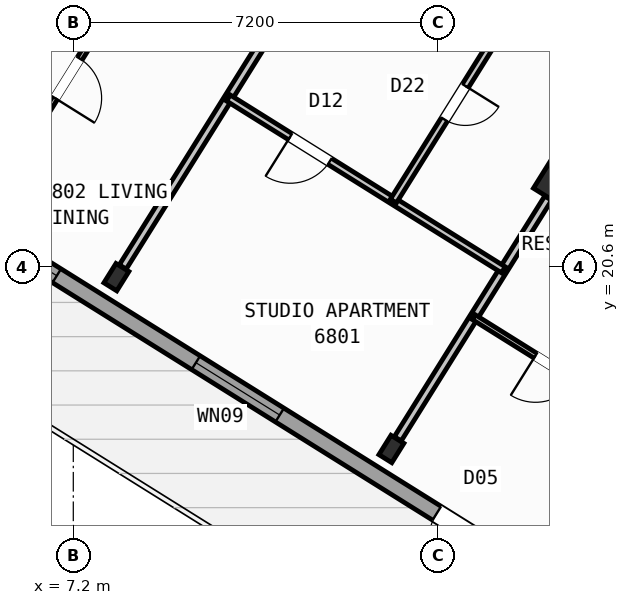
"""IFC4 building model, lengths in metres.
Left out: names, types, materials, properties, quantities, classifications, styles, units other than length and angle.
Written with IfcOpenShell. Run it as: python <this file> out.ifc"""

import sys

from ifc_helpers import new_model, si_unit, direction, frame, frame_2d, origin, origin_2d, place, context, subcontext, project, spatial, rectangle, hollow_rectangle, i_section, extrude, source, transform, mapped, element, fill, save


model = new_model("IFC4")
c1 = context("Model", 3, precision=1e-05, world=origin(), true_north=direction((0.0, 1.0)))
c2 = subcontext(c1, "Body", "Model", "MODEL_VIEW")
j1 = project(units=[si_unit("LENGTHUNIT", "METRE"), si_unit("PLANEANGLEUNIT", "RADIAN")], contexts=[c1])
p1 = place(None, origin())
s1 = spatial("IfcSite", under=j1, at=p1, CompositionType="ELEMENT")
p2 = place(p1, origin())
s2 = spatial("IfcBuilding", under=s1, at=p2, CompositionType="ELEMENT")
p3 = place(p2, frame((0.0, 0.0, 270.0)))
s3 = spatial("IfcBuildingStorey", under=s2, at=p3, CompositionType="ELEMENT", Elevation=270.0)
m1 = source(origin(), c2, "Body", "SweptSolid", [
    extrude(hollow_rectangle(XDim=0.7, YDim=0.7, WallThickness=0.028, at=origin_2d()), origin(), (0.0, 0.0, 1.0), 3.6),
])
p4 = place(p3, frame((16.764, 22.261, 0.0), z_axis=(0.0, 0.0, 1.0), x_axis=(-0.848048096156, 0.529919264233, 0.0)))
e1 = element("IfcColumn", 1, at=p4, inside=s3, PredefinedType="COLUMN", context=c2, shape_type="MappedRepresentation", body=[
    mapped(m1, transform((0.0, 0.0, 0.0), scale=1.0)),
])
m2 = source(origin(), c2, "Body", "SweptSolid", [
    extrude(i_section(OverallWidth=0.3, OverallDepth=0.45, WebThickness=0.014, FlangeThickness=0.026, at=origin_2d()), origin(), (0.0, 0.0, 1.0), 3.6),
])
for number, where, z_axis, x_axis in (
    (2, (13.478, 17.003, 0.0), (0.0, 0.0, 1.0), (-0.848, 0.53, 0.0)),
    (3, (8.051, 20.395, 0.0), (0.0, 0.0, 1.0), (-0.848, 0.53, 0.0)),
):
    element("IfcColumn", number, at=place(p3, frame(where, z_axis=z_axis, x_axis=x_axis)), inside=s3, PredefinedType="COLUMN", context=c2, shape_type="MappedRepresentation", body=[
        mapped(m2, transform((0.0, 0.0, 0.0), scale=1.0)),
    ])
p5 = place(p3, frame((29.268, 6.429, 0.0), z_axis=(0.0, 0.0, 1.0), x_axis=(-0.848049971435, 0.529916263149, 0.0)))
e4 = element("IfcWall", 4, at=p5, inside=s3, PredefinedType="STANDARD", context=c2, shape_type="SweptSolid", body=[
    extrude(rectangle(XDim=31.588, YDim=0.32, at=frame_2d((15.794, 0.0))), origin(), (0.0, 0.0, 1.0), 3.35),
])
p6 = place(p5, frame((16.362, 0.0, 0.0)))
e5 = element("IfcOpeningElement", 5, at=p6, cuts=e4, PredefinedType="OPENING", context=c2, shape_type="SweptSolid", body=[
    extrude(rectangle(XDim=1.2, YDim=2.15, at=frame_2d((0.6, 1.075))), frame((0.0, 0.17, 0.0), z_axis=(0.0, -1.0, 0.0), x_axis=(1.0, 0.0, 0.0)), (0.0, 0.0, 1.0), 0.34),
])
p7 = place(p5, frame((3.859, 0.0, 0.9)))
e6 = element("IfcOpeningElement", 6, at=p7, cuts=e4, PredefinedType="OPENING", context=c2, shape_type="SweptSolid", body=[
    extrude(rectangle(XDim=1.65, YDim=1.45, at=frame_2d((0.825, 0.725))), frame((0.0, 0.17, 0.0), z_axis=(0.0, -1.0, 0.0), x_axis=(1.0, 0.0, 0.0)), (0.0, 0.0, 1.0), 0.34),
])
p8 = place(p5, frame((10.519, 0.0, 0.9)))
e7 = element("IfcOpeningElement", 7, at=p8, cuts=e4, PredefinedType="OPENING", context=c2, shape_type="SweptSolid", body=[
    extrude(rectangle(XDim=1.65, YDim=1.45, at=frame_2d((0.825, 0.725))), frame((0.0, 0.17, 0.0), z_axis=(0.0, -1.0, 0.0), x_axis=(1.0, 0.0, 0.0)), (0.0, 0.0, 1.0), 0.34),
])
p9 = place(p5, frame((21.219, 0.0, 0.95)))
e8 = element("IfcOpeningElement", 8, at=p9, cuts=e4, PredefinedType="OPENING", context=c2, shape_type="SweptSolid", body=[
    extrude(rectangle(XDim=1.95, YDim=1.35, at=frame_2d((0.975, 0.675))), frame((0.0, 0.17, 0.0), z_axis=(0.0, -1.0, 0.0), x_axis=(1.0, 0.0, 0.0)), (0.0, 0.0, 1.0), 0.34),
])
p10 = place(p5, frame((26.406, 0.0, 1.0)))
e9 = element("IfcOpeningElement", 9, at=p10, cuts=e4, PredefinedType="OPENING", context=c2, shape_type="SweptSolid", body=[
    extrude(rectangle(XDim=0.9, YDim=1.25, at=frame_2d((0.45, 0.625))), frame((0.0, 0.17, 0.0), z_axis=(0.0, -1.0, 0.0), x_axis=(1.0, 0.0, 0.0)), (0.0, 0.0, 1.0), 0.34),
])
p11 = place(p5, frame((29.143, 0.0, 0.9)))
e10 = element("IfcOpeningElement", 10, at=p11, cuts=e4, PredefinedType="OPENING", context=c2, shape_type="SweptSolid", body=[
    extrude(rectangle(XDim=1.65, YDim=1.45, at=frame_2d((0.825, 0.725))), frame((0.0, 0.17, 0.0), z_axis=(0.0, -1.0, 0.0), x_axis=(1.0, 0.0, 0.0)), (0.0, 0.0, 1.0), 0.34),
])
p12 = place(p3, frame((2.415, 23.452, 0.0), z_axis=(0.0, 0.0, 1.0), x_axis=(0.52991049553, 0.848053575387, 0.0)))
e11 = element("IfcWall", 11, at=p12, inside=s3, PredefinedType="STANDARD", context=c2, shape_type="SweptSolid", body=[
    extrude(rectangle(XDim=21.587, YDim=0.32, at=frame_2d((10.794, 0.0))), origin(), (0.0, 0.0, 1.0), 2.875),
])
p13 = place(p12, frame((2.606, 0.0, 0.9)))
e12 = element("IfcOpeningElement", 12, at=p13, cuts=e11, PredefinedType="OPENING", context=c2, shape_type="SweptSolid", body=[
    extrude(rectangle(XDim=1.65, YDim=1.45, at=frame_2d((0.825, 0.725))), frame((0.0, 0.17, 0.0), z_axis=(0.0, -1.0, 0.0), x_axis=(1.0, 0.0, 0.0)), (0.0, 0.0, 1.0), 0.34),
])
p14 = place(p12, frame((7.504, 0.0, 1.0)))
e13 = element("IfcOpeningElement", 13, at=p14, cuts=e11, PredefinedType="OPENING", context=c2, shape_type="SweptSolid", body=[
    extrude(rectangle(XDim=0.9, YDim=1.25, at=frame_2d((0.45, 0.625))), frame((0.0, 0.17, 0.0), z_axis=(0.0, -1.0, 0.0), x_axis=(1.0, 0.0, 0.0)), (0.0, 0.0, 1.0), 0.34),
])
p15 = place(p12, frame((12.084, 0.0, 1.0)))
e14 = element("IfcOpeningElement", 14, at=p15, cuts=e11, PredefinedType="OPENING", context=c2, shape_type="SweptSolid", body=[
    extrude(rectangle(XDim=0.9, YDim=1.25, at=frame_2d((0.45, 0.625))), frame((0.0, 0.17, 0.0), z_axis=(0.0, -1.0, 0.0), x_axis=(1.0, 0.0, 0.0)), (0.0, 0.0, 1.0), 0.34),
])
p16 = place(p12, frame((15.619, 0.0, 1.0)))
e15 = element("IfcOpeningElement", 15, at=p16, cuts=e11, PredefinedType="OPENING", context=c2, shape_type="SweptSolid", body=[
    extrude(rectangle(XDim=0.9, YDim=1.25, at=frame_2d((0.45, 0.625))), frame((0.0, 0.17, 0.0), z_axis=(0.0, -1.0, 0.0), x_axis=(1.0, 0.0, 0.0)), (0.0, 0.0, 1.0), 0.34),
])
p17 = place(p12, frame((18.569, 0.0, 1.0)))
e16 = element("IfcOpeningElement", 16, at=p17, cuts=e11, PredefinedType="OPENING", context=c2, shape_type="SweptSolid", body=[
    extrude(rectangle(XDim=0.9, YDim=1.25, at=frame_2d((0.45, 0.625))), frame((0.0, 0.17, 0.0), z_axis=(0.0, -1.0, 0.0), x_axis=(1.0, 0.0, 0.0)), (0.0, 0.0, 1.0), 0.34),
])
p18 = place(p3, frame((21.329, 22.416, 0.0), z_axis=(0.0, 0.0, 1.0), x_axis=(-0.529920220799, -0.848047498427, 0.0)))
e17 = element("IfcWall", 17, at=p18, inside=s3, PredefinedType="PARTITIONING", context=c2, shape_type="SweptSolid", body=[
    extrude(rectangle(XDim=9.2, YDim=0.16, at=frame_2d((4.6, 0.0))), origin(), (0.0, 0.0, 1.0), 3.34),
])
p19 = place(p3, frame((22.495, 24.281, 0.0), z_axis=(0.0, 0.0, 1.0), x_axis=(-0.848052408131, 0.529912363569, 0.0)))
e18 = element("IfcWall", 18, at=p19, inside=s3, PredefinedType="PARTITIONING", context=c2, shape_type="SweptSolid", body=[
    extrude(rectangle(XDim=16.73, YDim=0.16, at=frame_2d((8.365, 0.0))), origin(), (0.0, 0.0, 1.0), 3.34),
])
p20 = place(p19, frame((2.22, 0.0, 0.0)))
e19 = element("IfcOpeningElement", 19, at=p20, cuts=e18, PredefinedType="OPENING", context=c2, shape_type="SweptSolid", body=[
    extrude(rectangle(XDim=0.86, YDim=2.05, at=frame_2d((0.43, 1.025))), frame((0.0, 0.09, 0.0), z_axis=(0.0, -1.0, 0.0), x_axis=(1.0, 0.0, 0.0)), (0.0, 0.0, 1.0), 0.18),
])
p21 = place(p19, frame((6.49, 0.0, 0.0)))
e20 = element("IfcOpeningElement", 20, at=p21, cuts=e18, PredefinedType="OPENING", context=c2, shape_type="SweptSolid", body=[
    extrude(rectangle(XDim=1.0, YDim=2.1, at=frame_2d((0.5, 1.05))), frame((0.0, 0.09, 0.0), z_axis=(0.0, -1.0, 0.0), x_axis=(1.0, 0.0, 0.0)), (0.0, 0.0, 1.0), 0.18),
])
p22 = place(p19, frame((14.76, 0.0, 0.0)))
e21 = element("IfcOpeningElement", 21, at=p22, cuts=e18, PredefinedType="OPENING", context=c2, shape_type="SweptSolid", body=[
    extrude(rectangle(XDim=1.0, YDim=2.1, at=frame_2d((0.5, 1.05))), frame((0.0, 0.09, 0.0), z_axis=(0.0, -1.0, 0.0), x_axis=(1.0, 0.0, 0.0)), (0.0, 0.0, 1.0), 0.18),
])
p23 = place(p3, frame((21.329, 22.416, 0.0), z_axis=(0.0, 0.0, 1.0), x_axis=(-0.848052408131, 0.529912363569, 0.0)))
e22 = element("IfcWall", 22, at=p23, inside=s3, PredefinedType="PARTITIONING", context=c2, shape_type="SweptSolid", body=[
    extrude(rectangle(XDim=16.73, YDim=0.16, at=frame_2d((8.365, 0.0))), origin(), (0.0, 0.0, 1.0), 3.34),
])
p24 = place(p23, frame((1.395, 0.0, 0.0)))
e23 = element("IfcOpeningElement", 23, at=p24, cuts=e22, PredefinedType="OPENING", context=c2, shape_type="SweptSolid", body=[
    extrude(rectangle(XDim=1.0, YDim=2.1, at=frame_2d((0.5, 1.05))), frame((0.0, 0.09, 0.0), z_axis=(0.0, -1.0, 0.0), x_axis=(1.0, 0.0, 0.0)), (0.0, 0.0, 1.0), 0.18),
])
p25 = place(p23, frame((7.82, 0.0, 0.0)))
e24 = element("IfcOpeningElement", 24, at=p25, cuts=e22, PredefinedType="OPENING", context=c2, shape_type="SweptSolid", body=[
    extrude(rectangle(XDim=1.0, YDim=2.1, at=frame_2d((0.5, 1.05))), frame((0.0, 0.09, 0.0), z_axis=(0.0, -1.0, 0.0), x_axis=(1.0, 0.0, 0.0)), (0.0, 0.0, 1.0), 0.18),
])
p26 = place(p23, frame((11.14, 0.0, 0.0)))
e25 = element("IfcOpeningElement", 25, at=p26, cuts=e22, PredefinedType="OPENING", context=c2, shape_type="SweptSolid", body=[
    extrude(rectangle(XDim=1.0, YDim=2.1, at=frame_2d((0.5, 1.05))), frame((0.0, 0.09, 0.0), z_axis=(0.0, -1.0, 0.0), x_axis=(1.0, 0.0, 0.0)), (0.0, 0.0, 1.0), 0.18),
])
p27 = place(p3, frame((16.572, 21.954, 0.0), z_axis=(0.0, 0.0, 1.0), x_axis=(-0.529904903214, -0.848057069748, 0.0)))
e26 = element("IfcWall", 26, at=p27, inside=s3, PredefinedType="PARTITIONING", context=c2, shape_type="SweptSolid", body=[
    extrude(rectangle(XDim=5.601, YDim=0.16, at=frame_2d((2.801, 0.0))), origin(), (0.0, 0.0, 1.0), 2.875),
])
p28 = place(p3, frame((18.318, 17.597, 0.0), z_axis=(0.0, 0.0, 1.0), x_axis=(-0.848059820872, 0.529900500304, 0.0)))
e27 = element("IfcWall", 27, at=p28, inside=s3, PredefinedType="PARTITIONING", context=c2, shape_type="SweptSolid", body=[
    extrude(rectangle(XDim=3.79, YDim=0.11, at=frame_2d((1.895, 0.0))), origin(), (0.0, 0.0, 1.0), 3.34),
])
p29 = place(p28, frame((1.435, 0.0, 0.0)))
e28 = element("IfcOpeningElement", 28, at=p29, cuts=e27, PredefinedType="OPENING", context=c2, shape_type="SweptSolid", body=[
    extrude(rectangle(XDim=0.92, YDim=2.08, at=frame_2d((0.46, 1.04))), frame((0.0, 0.065, 0.0), z_axis=(0.0, -1.0, 0.0), x_axis=(1.0, 0.0, 0.0)), (0.0, 0.0, 1.0), 0.13),
])
p30 = place(p3, frame((11.144, 25.346, 0.0), z_axis=(0.0, 0.0, 1.0), x_axis=(-0.529904903214, -0.848057069748, 0.0)))
e29 = element("IfcWall", 29, at=p30, inside=s3, PredefinedType="PARTITIONING", context=c2, shape_type="SweptSolid", body=[
    extrude(rectangle(XDim=5.601, YDim=0.16, at=frame_2d((2.801, 0.0))), origin(), (0.0, 0.0, 1.0), 2.875),
])
p31 = place(p3, frame((15.688, 20.54, 0.0), z_axis=(0.0, 0.0, 1.0), x_axis=(-0.848049732085, 0.529916646191, 0.0)))
e30 = element("IfcWall", 30, at=p31, inside=s3, PredefinedType="PLUMBINGWALL", context=c2, shape_type="SweptSolid", body=[
    extrude(rectangle(XDim=6.4, YDim=0.14, at=frame_2d((3.2, 0.0))), origin(), (0.0, 0.0, 1.0), 3.34),
])
p32 = place(p31, frame((4.04, 0.0, 0.0)))
e31 = element("IfcOpeningElement", 31, at=p32, cuts=e30, PredefinedType="OPENING", context=c2, shape_type="SweptSolid", body=[
    extrude(rectangle(XDim=0.92, YDim=2.08, at=frame_2d((0.46, 1.04))), frame((0.0, 0.08, 0.0), z_axis=(0.0, -1.0, 0.0), x_axis=(1.0, 0.0, 0.0)), (0.0, 0.0, 1.0), 0.16),
])
p33 = place(p3, frame((15.944, 25.781, 0.0), z_axis=(0.0, 0.0, 1.0), x_axis=(-0.529917480809, -0.848049210561, 0.0)))
e32 = element("IfcWall", 32, at=p33, inside=s3, PredefinedType="PLUMBINGWALL", context=c2, shape_type="SweptSolid", body=[
    extrude(rectangle(XDim=4.58, YDim=0.14, at=frame_2d((2.29, 0.0))), origin(), (0.0, 0.0, 1.0), 3.34),
])
p34 = place(p33, frame((1.9, 0.0, 0.0)))
e33 = element("IfcOpeningElement", 33, at=p34, cuts=e32, PredefinedType="OPENING", context=c2, shape_type="SweptSolid", body=[
    extrude(rectangle(XDim=0.78, YDim=2.05, at=frame_2d((0.39, 1.025))), frame((0.0, 0.08, 0.0), z_axis=(0.0, -1.0, 0.0), x_axis=(1.0, 0.0, 0.0)), (0.0, 0.0, 1.0), 0.16),
])
p35 = place(p3, frame((10.228, 29.352, 0.0), z_axis=(0.0, 0.0, 1.0), x_axis=(-0.529917830441, -0.848048992088, 0.0)))
e34 = element("IfcWall", 34, at=p35, inside=s3, PredefinedType="PARTITIONING", context=c2, shape_type="SweptSolid", body=[
    extrude(rectangle(XDim=9.47, YDim=0.11, at=frame_2d((4.735, 0.0))), origin(), (0.0, 0.0, 1.0), 3.34),
])
p36 = place(p35, frame((0.76, 0.0, 0.0)))
e35 = element("IfcOpeningElement", 35, at=p36, cuts=e34, PredefinedType="OPENING", context=c2, shape_type="SweptSolid", body=[
    extrude(rectangle(XDim=0.78, YDim=2.05, at=frame_2d((0.39, 1.025))), frame((0.0, 0.065, 0.0), z_axis=(0.0, -1.0, 0.0), x_axis=(1.0, 0.0, 0.0)), (0.0, 0.0, 1.0), 0.13),
])
p37 = place(p35, frame((5.475, 0.0, 0.0)))
e36 = element("IfcOpeningElement", 36, at=p37, cuts=e34, PredefinedType="OPENING", context=c2, shape_type="SweptSolid", body=[
    extrude(rectangle(XDim=0.92, YDim=2.08, at=frame_2d((0.46, 1.04))), frame((0.0, 0.065, 0.0), z_axis=(0.0, -1.0, 0.0), x_axis=(1.0, 0.0, 0.0)), (0.0, 0.0, 1.0), 0.13),
])
m3 = source(origin(), c2, "Body", "SweptSolid", [
    extrude(rectangle(XDim=1.2, YDim=2.15, at=frame_2d((0.6, 1.075))), frame((0.0, 0.025, 0.0), z_axis=(0.0, -1.0, 0.0), x_axis=(1.0, 0.0, 0.0)), (0.0, 0.0, 1.0), 0.05),
])
p38 = place(p6, origin())
e37 = element("IfcDoor", 37, at=p38, inside=s3, OperationType="SINGLE_SWING_LEFT", PredefinedType="DOOR", context=c2, shape_type="MappedRepresentation", body=[
    mapped(m3, transform((0.0, 0.0, 0.0), scale=1.0)),
])
fill(e5, e37)
m4 = source(origin(), c2, "Body", "SweptSolid", [
    extrude(rectangle(XDim=1.95, YDim=1.35, at=frame_2d((0.975, 0.675))), frame((0.0, 0.03, 0.0), z_axis=(0.0, -1.0, 0.0), x_axis=(1.0, 0.0, 0.0)), (0.0, 0.0, 1.0), 0.06),
])
p39 = place(p9, origin())
e38 = element("IfcWindow", 38, at=p39, inside=s3, PartitioningType="SINGLE_PANEL", PredefinedType="WINDOW", context=c2, shape_type="MappedRepresentation", body=[
    mapped(m4, transform((0.0, 0.0, 0.0), scale=1.0)),
])
fill(e8, e38)
m5 = source(origin(), c2, "Body", "SweptSolid", [
    extrude(rectangle(XDim=0.9, YDim=1.25, at=frame_2d((0.45, 0.625))), frame((0.0, 0.03, 0.0), z_axis=(0.0, -1.0, 0.0), x_axis=(1.0, 0.0, 0.0)), (0.0, 0.0, 1.0), 0.06),
])
p40 = place(p10, origin())
e39 = element("IfcWindow", 39, at=p40, inside=s3, PartitioningType="SINGLE_PANEL", PredefinedType="WINDOW", context=c2, shape_type="MappedRepresentation", body=[
    mapped(m5, transform((0.0, 0.0, 0.0), scale=1.0)),
])
fill(e9, e39)
m6 = source(origin(), c2, "Body", "SweptSolid", [
    extrude(rectangle(XDim=0.92, YDim=2.08, at=frame_2d((0.46, 1.04))), frame((0.0, 0.025, 0.0), z_axis=(0.0, -1.0, 0.0), x_axis=(1.0, 0.0, 0.0)), (0.0, 0.0, 1.0), 0.05),
])
p41 = place(p29, origin())
e40 = element("IfcDoor", 40, at=p41, inside=s3, OperationType="SINGLE_SWING_RIGHT", PredefinedType="DOOR", context=c2, shape_type="MappedRepresentation", body=[
    mapped(m6, transform((0.0, 0.0, 0.0), scale=1.0)),
])
fill(e28, e40)
p42 = place(p32, origin())
e41 = element("IfcDoor", 41, at=p42, inside=s3, OperationType="SINGLE_SWING_RIGHT", PredefinedType="DOOR", context=c2, shape_type="MappedRepresentation", body=[
    mapped(m6, transform((0.0, 0.0, 0.0), scale=1.0)),
])
fill(e31, e41)
m7 = source(origin(), c2, "Body", "SweptSolid", [
    extrude(rectangle(XDim=0.78, YDim=2.05, at=frame_2d((0.39, 1.025))), frame((0.0, 0.025, 0.0), z_axis=(0.0, -1.0, 0.0), x_axis=(1.0, 0.0, 0.0)), (0.0, 0.0, 1.0), 0.05),
])
p43 = place(p34, origin())
e42 = element("IfcDoor", 42, at=p43, inside=s3, OperationType="SINGLE_SWING_LEFT", PredefinedType="DOOR", context=c2, shape_type="MappedRepresentation", body=[
    mapped(m7, transform((0.0, 0.0, 0.0), scale=1.0)),
])
fill(e33, e42)
p44 = place(p37, origin())
e43 = element("IfcDoor", 43, at=p44, inside=s3, OperationType="SINGLE_SWING_RIGHT", PredefinedType="DOOR", context=c2, shape_type="MappedRepresentation", body=[
    mapped(m6, transform((0.0, 0.0, 0.0), scale=1.0)),
])
fill(e36, e43)
save(model, sys.argv[1])
